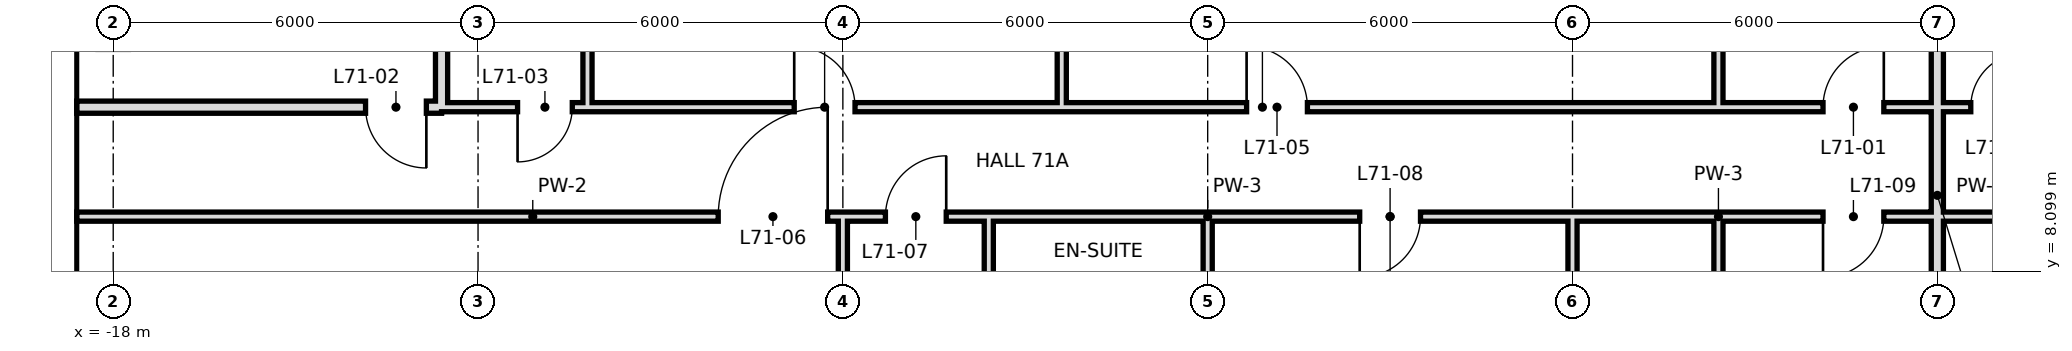
"""IFC4 building model, lengths in metres.
Left out: names, types, materials, properties, quantities, classifications, styles, units other than length and angle.
Written with IfcOpenShell. Run it as: python <this file> out.ifc"""

import sys

from ifc_helpers import new_model, si_unit, direction, frame, frame_2d, origin, place, context, subcontext, project, spatial, rectangle, extrude, element, fill, save


model = new_model("IFC4")
c1 = context("Model", 3, precision=1e-05, world=origin(), true_north=direction((0.0, 1.0)))
c2 = subcontext(c1, "Body", "Model", "MODEL_VIEW")
j1 = project(units=[si_unit("LENGTHUNIT", "METRE"), si_unit("PLANEANGLEUNIT", "RADIAN")], contexts=[c1])
p1 = place(None, origin())
s1 = spatial("IfcSite", under=j1, at=p1, CompositionType="ELEMENT")
p2 = place(p1, origin())
s2 = spatial("IfcBuilding", under=s1, at=p2, CompositionType="ELEMENT")
p3 = place(p2, frame((0.0, 0.0, 301.6)))
s3 = spatial("IfcBuildingStorey", under=s2, at=p3, CompositionType="ELEMENT", Elevation=301.6)
p4 = place(p3, frame((-10.2, 10.8, 0.0), z_axis=(0.0, 0.0, 1.0), x_axis=(0.0, 1.0, 0.0)))
e1 = element("IfcWall", 1, at=p4, inside=s3, PredefinedType="PARTITIONING", context=c2, shape_type="SweptSolid", body=[
    extrude(rectangle(XDim=7.2, YDim=0.15, at=frame_2d((3.6, 0.0))), origin(), (0.0, 0.0, 1.0), 3.42),
])
p5 = place(p3, frame((-12.6, 10.8, 0.0), z_axis=(0.0, 0.0, 1.0), x_axis=(0.0, 1.0, 0.0)))
e2 = element("IfcWall", 2, at=p5, inside=s3, PredefinedType="SOLIDWALL", context=c2, shape_type="SweptSolid", body=[
    extrude(rectangle(XDim=7.2, YDim=0.2, at=frame_2d((3.6, 0.0))), origin(), (0.0, 0.0, 1.0), 2.97),
])
p6 = place(p3, frame((-2.4, 10.8, 0.0), z_axis=(0.0, 0.0, 1.0), x_axis=(0.0, 1.0, 0.0)))
e3 = element("IfcWall", 3, at=p6, inside=s3, PredefinedType="PARTITIONING", context=c2, shape_type="SweptSolid", body=[
    extrude(rectangle(XDim=7.2, YDim=0.15, at=frame_2d((3.6, 0.0))), origin(), (0.0, 0.0, 1.0), 3.42),
])
p7 = place(p3, frame((-3.6, 6.0, 0.0), z_axis=(0.0, 0.0, 1.0), x_axis=(0.0, 1.0, 0.0)))
e4 = element("IfcWall", 4, at=p7, inside=s3, PredefinedType="PARTITIONING", context=c2, shape_type="SweptSolid", body=[
    extrude(rectangle(XDim=3.0, YDim=0.15, at=frame_2d((1.5, 0.0))), origin(), (0.0, 0.0, 1.0), 3.42),
])
p8 = place(p3, frame((-6.0, -0.6, 0.0), z_axis=(0.0, 0.0, 1.0), x_axis=(0.0, 1.0, 0.0)))
e5 = element("IfcWall", 5, at=p8, inside=s3, PredefinedType="PARTITIONING", context=c2, shape_type="SweptSolid", body=[
    extrude(rectangle(XDim=9.6, YDim=0.15, at=frame_2d((4.8, 0.0))), origin(), (0.0, 0.0, 1.0), 3.42),
])
p9 = place(p3, frame((0.0, 6.0, 0.0), z_axis=(0.0, 0.0, 1.0), x_axis=(0.0, 1.0, 0.0)))
e6 = element("IfcWall", 6, at=p9, inside=s3, PredefinedType="PARTITIONING", context=c2, shape_type="SweptSolid", body=[
    extrude(rectangle(XDim=3.0, YDim=0.15, at=frame_2d((1.5, 0.0))), origin(), (0.0, 0.0, 1.0), 2.72),
])
p10 = place(p3, frame((12.0, 0.0, 0.0), z_axis=(0.0, 0.0, 1.0), x_axis=(0.0, 1.0, 0.0)))
e7 = element("IfcWall", 7, at=p10, inside=s3, PredefinedType="SOLIDWALL", context=c2, shape_type="SweptSolid", body=[
    extrude(rectangle(XDim=18.7, YDim=0.2, at=frame_2d((9.35, 0.0))), origin(), (0.0, 0.0, 1.0), 2.72),
])
p11 = place(p3, frame((6.0, 6.0, 0.0), z_axis=(0.0, 0.0, 1.0), x_axis=(0.0, 1.0, 0.0)))
e8 = element("IfcWall", 8, at=p11, inside=s3, PredefinedType="PARTITIONING", context=c2, shape_type="SweptSolid", body=[
    extrude(rectangle(XDim=3.0, YDim=0.15, at=frame_2d((1.5, 0.0))), origin(), (0.0, 0.0, 1.0), 2.72),
])
p12 = place(p3, frame((8.4, 10.8, 0.0), z_axis=(0.0, 0.0, 1.0), x_axis=(0.0, 1.0, 0.0)))
e9 = element("IfcWall", 9, at=p12, inside=s3, PredefinedType="PARTITIONING", context=c2, shape_type="SweptSolid", body=[
    extrude(rectangle(XDim=7.9, YDim=0.15, at=frame_2d((3.95, 0.0))), origin(), (0.0, 0.0, 1.0), 3.42),
])
p13 = place(p3, frame((8.4, 6.0, 0.0), z_axis=(0.0, 0.0, 1.0), x_axis=(0.0, 1.0, 0.0)))
e10 = element("IfcWall", 10, at=p13, inside=s3, PredefinedType="PARTITIONING", context=c2, shape_type="SweptSolid", body=[
    extrude(rectangle(XDim=3.0, YDim=0.15, at=frame_2d((1.5, 0.0))), origin(), (0.0, 0.0, 1.0), 3.42),
])
p14 = place(p3, frame((-18.6, 10.8, 0.0), z_axis=(0.0, 0.0, 1.0), x_axis=(1.0, 0.0, 0.0)))
e11 = element("IfcWall", 11, at=p14, inside=s3, PredefinedType="SOLIDWALL", context=c2, shape_type="SweptSolid", body=[
    extrude(rectangle(XDim=6.0, YDim=0.2, at=frame_2d((3.0, 0.0))), origin(), (0.0, 0.0, 1.0), 2.97),
])
p15 = place(p14, frame((4.75, 0.0, 0.0)))
e12 = element("IfcOpeningElement", 12, at=p15, cuts=e11, PredefinedType="OPENING", context=c2, shape_type="SweptSolid", body=[
    extrude(rectangle(XDim=1.0, YDim=2.4, at=frame_2d((0.5, 1.2))), frame((0.0, 0.11, 0.0), z_axis=(0.0, -1.0, 0.0), x_axis=(1.0, 0.0, 0.0)), (0.0, 0.0, 1.0), 0.22),
])
p16 = place(p3, frame((-10.2, 10.8, 0.0), z_axis=(0.0, 0.0, 1.0), x_axis=(1.0, 0.0, 0.0)))
e13 = element("IfcWall", 13, at=p16, inside=s3, PredefinedType="PARTITIONING", context=c2, shape_type="SweptSolid", body=[
    extrude(rectangle(XDim=22.2, YDim=0.15, at=frame_2d((11.1, 0.0))), origin(), (0.0, 0.0, 1.0), 3.42),
])
p17 = place(p16, frame((20.32, 0.0, 0.0)))
e14 = element("IfcOpeningElement", 14, at=p17, cuts=e13, PredefinedType="OPENING", context=c2, shape_type="SweptSolid", body=[
    extrude(rectangle(XDim=1.0, YDim=2.4, at=frame_2d((0.5, 1.2))), frame((0.0, 0.085, 0.0), z_axis=(0.0, -1.0, 0.0), x_axis=(1.0, 0.0, 0.0)), (0.0, 0.0, 1.0), 0.17),
])
p18 = place(p16, frame((3.4, 0.0, 0.0)))
e15 = element("IfcOpeningElement", 15, at=p18, cuts=e13, PredefinedType="OPENING", context=c2, shape_type="SweptSolid", body=[
    extrude(rectangle(XDim=1.0, YDim=2.4, at=frame_2d((0.5, 1.2))), frame((0.0, 0.085, 0.0), z_axis=(0.0, -1.0, 0.0), x_axis=(1.0, 0.0, 0.0)), (0.0, 0.0, 1.0), 0.17),
])
p19 = place(p16, frame((10.84, 0.0, 0.0)))
e16 = element("IfcOpeningElement", 16, at=p19, cuts=e13, PredefinedType="OPENING", context=c2, shape_type="SweptSolid", body=[
    extrude(rectangle(XDim=1.0, YDim=2.4, at=frame_2d((0.5, 1.2))), frame((0.0, 0.085, 0.0), z_axis=(0.0, -1.0, 0.0), x_axis=(1.0, 0.0, 0.0)), (0.0, 0.0, 1.0), 0.17),
])
p20 = place(p3, frame((-12.6, 10.8, 0.0), z_axis=(0.0, 0.0, 1.0), x_axis=(1.0, 0.0, 0.0)))
e17 = element("IfcWall", 17, at=p20, inside=s3, PredefinedType="PARTITIONING", context=c2, shape_type="SweptSolid", body=[
    extrude(rectangle(XDim=2.4, YDim=0.15, at=frame_2d((1.2, 0.0))), origin(), (0.0, 0.0, 1.0), 3.42),
])
p21 = place(p20, frame((1.25, 0.0, 0.0)))
e18 = element("IfcOpeningElement", 18, at=p21, cuts=e17, PredefinedType="OPENING", context=c2, shape_type="SweptSolid", body=[
    extrude(rectangle(XDim=0.9, YDim=2.4, at=frame_2d((0.45, 1.2))), frame((0.0, 0.085, 0.0), z_axis=(0.0, -1.0, 0.0), x_axis=(1.0, 0.0, 0.0)), (0.0, 0.0, 1.0), 0.17),
])
p22 = place(p3, frame((12.0, 10.8, 0.0), z_axis=(0.0, 0.0, 1.0), x_axis=(1.0, 0.0, 0.0)))
e19 = element("IfcWall", 19, at=p22, inside=s3, PredefinedType="PARTITIONING", context=c2, shape_type="SweptSolid", body=[
    extrude(rectangle(XDim=2.4, YDim=0.15, at=frame_2d((1.2, 0.0))), origin(), (0.0, 0.0, 1.0), 3.42),
])
p23 = place(p22, frame((0.55, 0.0, 0.0)))
e20 = element("IfcOpeningElement", 20, at=p23, cuts=e19, PredefinedType="OPENING", context=c2, shape_type="SweptSolid", body=[
    extrude(rectangle(XDim=0.9, YDim=2.4, at=frame_2d((0.45, 1.2))), frame((0.0, 0.085, 0.0), z_axis=(0.0, -1.0, 0.0), x_axis=(1.0, 0.0, 0.0)), (0.0, 0.0, 1.0), 0.17),
])
p24 = place(p3, frame((-18.6, 9.0, 0.0), z_axis=(0.0, 0.0, 1.0), x_axis=(1.0, 0.0, 0.0)))
e21 = element("IfcWall", 21, at=p24, inside=s3, PredefinedType="PARTITIONING", context=c2, shape_type="SweptSolid", body=[
    extrude(rectangle(XDim=15.0, YDim=0.15, at=frame_2d((7.5, 0.0))), origin(), (0.0, 0.0, 1.0), 3.42),
])
p25 = place(p24, frame((10.55, 0.0, 0.0)))
e22 = element("IfcOpeningElement", 22, at=p25, cuts=e21, PredefinedType="OPENING", context=c2, shape_type="SweptSolid", body=[
    extrude(rectangle(XDim=1.8, YDim=2.4, at=frame_2d((0.9, 1.2))), frame((0.0, 0.085, 0.0), z_axis=(0.0, -1.0, 0.0), x_axis=(1.0, 0.0, 0.0)), (0.0, 0.0, 1.0), 0.17),
])
p26 = place(p24, frame((13.3, 0.0, 0.0)))
e23 = element("IfcOpeningElement", 23, at=p26, cuts=e21, PredefinedType="OPENING", context=c2, shape_type="SweptSolid", body=[
    extrude(rectangle(XDim=1.0, YDim=2.4, at=frame_2d((0.5, 1.2))), frame((0.0, 0.085, 0.0), z_axis=(0.0, -1.0, 0.0), x_axis=(1.0, 0.0, 0.0)), (0.0, 0.0, 1.0), 0.17),
])
p27 = place(p3, frame((0.0, 9.0, 0.0), z_axis=(0.0, 0.0, 1.0), x_axis=(1.0, 0.0, 0.0)))
e24 = element("IfcWall", 24, at=p27, inside=s3, PredefinedType="PARTITIONING", context=c2, shape_type="SweptSolid", body=[
    extrude(rectangle(XDim=6.0, YDim=0.15, at=frame_2d((3.0, 0.0))), origin(), (0.0, 0.0, 1.0), 3.42),
])
p28 = place(p27, frame((2.5, 0.0, 0.0)))
e25 = element("IfcOpeningElement", 25, at=p28, cuts=e24, PredefinedType="OPENING", context=c2, shape_type="SweptSolid", body=[
    extrude(rectangle(XDim=1.0, YDim=2.4, at=frame_2d((0.5, 1.2))), frame((0.0, 0.085, 0.0), z_axis=(0.0, -1.0, 0.0), x_axis=(1.0, 0.0, 0.0)), (0.0, 0.0, 1.0), 0.17),
])
p29 = place(p3, frame((8.4, 9.0, 0.0), z_axis=(0.0, 0.0, 1.0), x_axis=(1.0, 0.0, 0.0)))
e26 = element("IfcWall", 26, at=p29, inside=s3, PredefinedType="PARTITIONING", context=c2, shape_type="SweptSolid", body=[
    extrude(rectangle(XDim=9.6, YDim=0.15, at=frame_2d((4.8, 0.0))), origin(), (0.0, 0.0, 1.0), 3.42),
])
p30 = place(p29, frame((1.72, 0.0, 0.0)))
e27 = element("IfcOpeningElement", 27, at=p30, cuts=e26, PredefinedType="OPENING", context=c2, shape_type="SweptSolid", body=[
    extrude(rectangle(XDim=1.0, YDim=2.4, at=frame_2d((0.5, 1.2))), frame((0.0, 0.085, 0.0), z_axis=(0.0, -1.0, 0.0), x_axis=(1.0, 0.0, 0.0)), (0.0, 0.0, 1.0), 0.17),
])
p31 = place(p29, frame((5.2, 0.0, 0.0)))
e28 = element("IfcOpeningElement", 28, at=p31, cuts=e26, PredefinedType="OPENING", context=c2, shape_type="SweptSolid", body=[
    extrude(rectangle(XDim=1.0, YDim=2.4, at=frame_2d((0.5, 1.2))), frame((0.0, 0.085, 0.0), z_axis=(0.0, -1.0, 0.0), x_axis=(1.0, 0.0, 0.0)), (0.0, 0.0, 1.0), 0.17),
])
p32 = place(p3, frame((-3.6, 9.0, 0.0), z_axis=(0.0, 0.0, 1.0), x_axis=(1.0, 0.0, 0.0)))
e29 = element("IfcWall", 29, at=p32, inside=s3, PredefinedType="PARTITIONING", context=c2, shape_type="SweptSolid", body=[
    extrude(rectangle(XDim=3.6, YDim=0.15, at=frame_2d((1.8, 0.0))), origin(), (0.0, 0.0, 1.0), 3.42),
])
p33 = place(p3, frame((6.0, 9.0, 0.0), z_axis=(0.0, 0.0, 1.0), x_axis=(1.0, 0.0, 0.0)))
e30 = element("IfcWall", 30, at=p33, inside=s3, PredefinedType="PARTITIONING", context=c2, shape_type="SweptSolid", body=[
    extrude(rectangle(XDim=2.4, YDim=0.15, at=frame_2d((1.2, 0.0))), origin(), (0.0, 0.0, 1.0), 3.42),
])
p34 = place(p17, frame((1.0, 0.0, 0.0), z_axis=(0.0, 0.0, 1.0), x_axis=(-1.0, 0.0, 0.0)))
e31 = element("IfcDoor", 31, at=p34, inside=s3, OperationType="SINGLE_SWING_LEFT", PredefinedType="DOOR", context=c2, shape_type="SweptSolid", body=[
    extrude(rectangle(XDim=1.0, YDim=2.4, at=frame_2d((0.5, 1.2))), frame((0.0, 0.025, 0.0), z_axis=(0.0, -1.0, 0.0), x_axis=(1.0, 0.0, 0.0)), (0.0, 0.0, 1.0), 0.05),
])
fill(e14, e31)
p35 = place(p15, origin())
e32 = element("IfcDoor", 32, at=p35, inside=s3, OperationType="SINGLE_SWING_RIGHT", PredefinedType="DOOR", context=c2, shape_type="SweptSolid", body=[
    extrude(rectangle(XDim=1.0, YDim=2.4, at=frame_2d((0.5, 1.2))), frame((0.0, 0.025, 0.0), z_axis=(0.0, -1.0, 0.0), x_axis=(1.0, 0.0, 0.0)), (0.0, 0.0, 1.0), 0.05),
])
fill(e12, e32)
p36 = place(p21, frame((0.9, 0.0, 0.0), z_axis=(0.0, 0.0, 1.0), x_axis=(-1.0, 0.0, 0.0)))
e33 = element("IfcDoor", 33, at=p36, inside=s3, OperationType="SINGLE_SWING_RIGHT", PredefinedType="DOOR", context=c2, shape_type="SweptSolid", body=[
    extrude(rectangle(XDim=0.9, YDim=2.4, at=frame_2d((0.45, 1.2))), frame((0.0, 0.025, 0.0), z_axis=(0.0, -1.0, 0.0), x_axis=(1.0, 0.0, 0.0)), (0.0, 0.0, 1.0), 0.05),
])
fill(e18, e33)
p37 = place(p18, origin())
e34 = element("IfcDoor", 34, at=p37, inside=s3, OperationType="SINGLE_SWING_LEFT", PredefinedType="DOOR", context=c2, shape_type="SweptSolid", body=[
    extrude(rectangle(XDim=1.0, YDim=2.4, at=frame_2d((0.5, 1.2))), frame((0.0, 0.025, 0.0), z_axis=(0.0, -1.0, 0.0), x_axis=(1.0, 0.0, 0.0)), (0.0, 0.0, 1.0), 0.05),
])
fill(e15, e34)
p38 = place(p19, origin())
e35 = element("IfcDoor", 35, at=p38, inside=s3, OperationType="SINGLE_SWING_LEFT", PredefinedType="DOOR", context=c2, shape_type="SweptSolid", body=[
    extrude(rectangle(XDim=1.0, YDim=2.4, at=frame_2d((0.5, 1.2))), frame((0.0, 0.025, 0.0), z_axis=(0.0, -1.0, 0.0), x_axis=(1.0, 0.0, 0.0)), (0.0, 0.0, 1.0), 0.05),
])
fill(e16, e35)
p39 = place(p25, frame((1.8, 0.0, 0.0), z_axis=(0.0, 0.0, 1.0), x_axis=(-1.0, 0.0, 0.0)))
e36 = element("IfcDoor", 36, at=p39, inside=s3, OperationType="SINGLE_SWING_LEFT", PredefinedType="DOOR", context=c2, shape_type="SweptSolid", body=[
    extrude(rectangle(XDim=1.8, YDim=2.4, at=frame_2d((0.9, 1.2))), frame((0.0, 0.025, 0.0), z_axis=(0.0, -1.0, 0.0), x_axis=(1.0, 0.0, 0.0)), (0.0, 0.0, 1.0), 0.05),
])
fill(e22, e36)
p40 = place(p26, frame((1.0, 0.0, 0.0), z_axis=(0.0, 0.0, 1.0), x_axis=(-1.0, 0.0, 0.0)))
e37 = element("IfcDoor", 37, at=p40, inside=s3, OperationType="SINGLE_SWING_LEFT", PredefinedType="DOOR", context=c2, shape_type="SweptSolid", body=[
    extrude(rectangle(XDim=1.0, YDim=2.4, at=frame_2d((0.5, 1.2))), frame((0.0, 0.025, 0.0), z_axis=(0.0, -1.0, 0.0), x_axis=(1.0, 0.0, 0.0)), (0.0, 0.0, 1.0), 0.05),
])
fill(e23, e37)
p41 = place(p28, frame((1.0, 0.0, 0.0), z_axis=(0.0, 0.0, 1.0), x_axis=(-1.0, 0.0, 0.0)))
e38 = element("IfcDoor", 38, at=p41, inside=s3, OperationType="SINGLE_SWING_RIGHT", PredefinedType="DOOR", context=c2, shape_type="SweptSolid", body=[
    extrude(rectangle(XDim=1.0, YDim=2.4, at=frame_2d((0.5, 1.2))), frame((0.0, 0.025, 0.0), z_axis=(0.0, -1.0, 0.0), x_axis=(1.0, 0.0, 0.0)), (0.0, 0.0, 1.0), 0.05),
])
fill(e25, e38)
p42 = place(p30, frame((1.0, 0.0, 0.0), z_axis=(0.0, 0.0, 1.0), x_axis=(-1.0, 0.0, 0.0)))
e39 = element("IfcDoor", 39, at=p42, inside=s3, OperationType="SINGLE_SWING_RIGHT", PredefinedType="DOOR", context=c2, shape_type="SweptSolid", body=[
    extrude(rectangle(XDim=1.0, YDim=2.4, at=frame_2d((0.5, 1.2))), frame((0.0, 0.025, 0.0), z_axis=(0.0, -1.0, 0.0), x_axis=(1.0, 0.0, 0.0)), (0.0, 0.0, 1.0), 0.05),
])
fill(e27, e39)
p43 = place(p23, frame((0.9, 0.0, 0.0), z_axis=(0.0, 0.0, 1.0), x_axis=(-1.0, 0.0, 0.0)))
e40 = element("IfcDoor", 40, at=p43, inside=s3, OperationType="SINGLE_SWING_LEFT", PredefinedType="DOOR", context=c2, shape_type="SweptSolid", body=[
    extrude(rectangle(XDim=0.9, YDim=2.4, at=frame_2d((0.45, 1.2))), frame((0.0, 0.025, 0.0), z_axis=(0.0, -1.0, 0.0), x_axis=(1.0, 0.0, 0.0)), (0.0, 0.0, 1.0), 0.05),
])
fill(e20, e40)
save(model, sys.argv[1])
